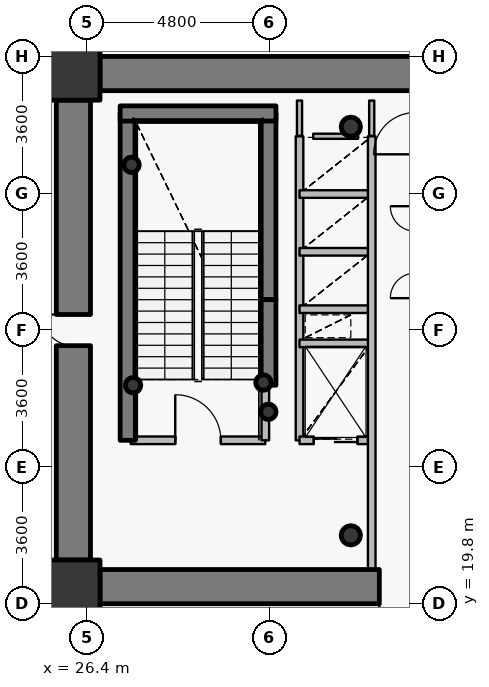
"""IFC4 building model, lengths in metres.
Left out: names, types, materials, properties, quantities, classifications, styles, units other than length and angle.
Written with IfcOpenShell. Run it as: python <this file> out.ifc"""

import sys

from ifc_helpers import new_model, si_unit, direction, frame, frame_2d, origin, origin_2d, place, context, subcontext, project, spatial, rectangle, hollow_circle, extrude, source, transform, mapped, element, fill, save


model = new_model("IFC4")
c1 = context("Model", 3, precision=1e-05, world=origin(), true_north=direction((0.0, 1.0)))
c2 = subcontext(c1, "Body", "Model", "MODEL_VIEW")
j1 = project(units=[si_unit("LENGTHUNIT", "METRE"), si_unit("PLANEANGLEUNIT", "RADIAN")], contexts=[c1])
p1 = place(None, origin())
s1 = spatial("IfcSite", under=j1, at=p1, CompositionType="ELEMENT")
p2 = place(p1, origin())
s2 = spatial("IfcBuilding", under=s1, at=p2, CompositionType="ELEMENT")
p3 = place(p2, frame((0.0, 0.0, 40.8)))
s3 = spatial("IfcBuildingStorey", under=s2, at=p3, CompositionType="ELEMENT", Elevation=40.8)
for number, where, z_axis, x_axis in (
    (1, (26.05, 20.25, 0.0), (0.0, 0.0, 1.0), (1.0, 0.0, 0.0)),
    (2, (26.05, 33.75, 0.0), (0.0, 0.0, 1.0), (1.0, 0.0, 0.0)),
):
    element("IfcColumn", number, at=place(p3, frame(where, z_axis=z_axis, x_axis=x_axis)), inside=s3, PredefinedType="COLUMN", context=c2, shape_type="SweptSolid", body=[
        extrude(rectangle(XDim=1.4, YDim=1.4, at=origin_2d()), origin(), (0.0, 0.0, 1.0), 4.2),
    ])
for number, where, z_axis, x_axis in (
    (3, (33.35, 21.6, 0.0), (0.0, 0.0, 1.0), (1.0, 0.0, 0.0)),
    (4, (33.35, 32.35, 0.0), (0.0, 0.0, 1.0), (1.0, 0.0, 0.0)),
):
    element("IfcColumn", number, at=place(p3, frame(where, z_axis=z_axis, x_axis=x_axis)), inside=s3, PredefinedType="COLUMN", context=c2, shape_type="SweptSolid", body=[
        extrude(hollow_circle(Radius=0.254, WallThickness=0.02, at=origin_2d()), origin(), (0.0, 0.0, 1.0), 4.2),
    ])
p4 = place(p3, frame((27.48, 24.1, 0.0), z_axis=(0.0, 0.0, 1.0), x_axis=(0.0, 1.0, 0.0)))
e5 = element("IfcWall", 5, at=p4, inside=s3, PredefinedType="SHEAR", context=c2, shape_type="SweptSolid", body=[
    extrude(rectangle(XDim=8.6, YDim=0.4, at=frame_2d((4.3, 0.0))), origin(), (0.0, 0.0, 1.0), 4.2),
])
p5 = place(p3, frame((31.18, 27.8, 0.0), z_axis=(0.0, 0.0, 1.0), x_axis=(0.0, 1.0, 0.0)))
e6 = element("IfcWall", 6, at=p5, inside=s3, PredefinedType="SHEAR", context=c2, shape_type="SweptSolid", body=[
    extrude(rectangle(XDim=4.9, YDim=0.4, at=frame_2d((2.45, 0.0))), origin(), (0.0, 0.0, 1.0), 4.2),
])
p6 = place(p3, frame((27.28, 32.7, 0.0), z_axis=(0.0, 0.0, 1.0), x_axis=(1.0, 0.0, 0.0)))
e7 = element("IfcWall", 7, at=p6, inside=s3, PredefinedType="SHEAR", context=c2, shape_type="SweptSolid", body=[
    extrude(rectangle(XDim=4.1, YDim=0.4, at=frame_2d((2.05, 0.0))), origin(), (0.0, 0.0, 1.0), 4.2),
])
for number, where, z_axis, x_axis in (
    (8, (27.58, 31.35, 0.0), (0.0, 0.0, 1.0), (1.0, 0.0, 0.0)),
    (9, (31.05, 25.62, 0.0), (0.0, 0.0, 1.0), (1.0, 0.0, 0.0)),
    (10, (31.18, 24.85, 0.0), (0.0, 0.0, 1.0), (1.0, 0.0, 0.0)),
    (11, (27.62, 25.55, 0.0), (0.0, 0.0, 1.0), (1.0, 0.0, 0.0)),
):
    element("IfcColumn", number, at=place(p3, frame(where, z_axis=z_axis, x_axis=x_axis)), inside=s3, PredefinedType="COLUMN", context=c2, shape_type="SweptSolid", body=[
        extrude(hollow_circle(Radius=0.203, WallThickness=0.016, at=origin_2d()), origin(), (0.0, 0.0, 1.0), 4.2),
    ])
p7 = place(p3, frame((26.75, 33.75, 0.0), z_axis=(0.0, 0.0, 1.0), x_axis=(1.0, 0.0, 0.0)))
e12 = element("IfcWall", 12, at=p7, inside=s3, PredefinedType="SHEAR", context=c2, shape_type="SweptSolid", body=[
    extrude(rectangle(XDim=18.5, YDim=0.9, at=frame_2d((9.25, 0.0))), origin(), (0.0, 0.0, 1.0), 3.4),
])
p8 = place(p3, frame((45.25, 20.25, 0.0), z_axis=(0.0, 0.0, 1.0), x_axis=(-1.0, 0.0, 0.0)))
e13 = element("IfcWall", 13, at=p8, inside=s3, PredefinedType="SHEAR", context=c2, shape_type="SweptSolid", body=[
    extrude(rectangle(XDim=18.5, YDim=0.9, at=frame_2d((9.25, 0.0))), origin(), (0.0, 0.0, 1.0), 3.4),
])
p9 = place(p8, frame((10.0, 0.0, 0.0)))
e14 = element("IfcOpeningElement", 14, at=p9, cuts=e13, PredefinedType="OPENING", context=c2, shape_type="SweptSolid", body=[
    extrude(rectangle(XDim=1.15, YDim=2.15, at=origin_2d()), frame((0.575, 0.46, 1.075), z_axis=(0.0, -1.0, 0.0), x_axis=(1.0, 0.0, 0.0)), (0.0, 0.0, 1.0), 0.92),
])
p10 = place(p3, frame((26.05, 20.95, 0.0), z_axis=(0.0, 0.0, 1.0), x_axis=(0.0, 1.0, 0.0)))
e15 = element("IfcWall", 15, at=p10, inside=s3, PredefinedType="SHEAR", context=c2, shape_type="SweptSolid", body=[
    extrude(rectangle(XDim=12.1, YDim=0.9, at=frame_2d((6.05, 0.0))), origin(), (0.0, 0.0, 1.0), 3.4),
])
p11 = place(p10, frame((5.64, 0.0, 0.0)))
e16 = element("IfcOpeningElement", 16, at=p11, cuts=e15, PredefinedType="OPENING", context=c2, shape_type="SweptSolid", body=[
    extrude(rectangle(XDim=0.82, YDim=2.1, at=origin_2d()), frame((0.41, 0.46, 1.05), z_axis=(0.0, -1.0, 0.0), x_axis=(1.0, 0.0, 0.0)), (0.0, 0.0, 1.0), 0.92),
])
p12 = place(p3, frame((31.18, 25.55, 0.0), z_axis=(0.0, 0.0, 1.0), x_axis=(0.0, 1.0, 0.0)))
e17 = element("IfcWall", 17, at=p12, inside=s3, PredefinedType="SHEAR", context=c2, shape_type="SweptSolid", body=[
    extrude(rectangle(XDim=2.25, YDim=0.4, at=frame_2d((1.125, 0.0))), origin(), (0.0, 0.0, 1.0), 3.55),
])
p13 = place(p3, frame((27.56, 24.1, 0.0), z_axis=(0.0, 0.0, 1.0), x_axis=(1.0, 0.0, 0.0)))
e18 = element("IfcWall", 18, at=p13, inside=s3, PredefinedType="PARTITIONING", context=c2, shape_type="SweptSolid", body=[
    extrude(rectangle(XDim=3.54, YDim=0.2, at=frame_2d((1.77, 0.0))), origin(), (0.0, 0.0, 1.0), 3.95),
])
p14 = place(p13, frame((1.17, 0.0, 0.0)))
e19 = element("IfcOpeningElement", 19, at=p14, cuts=e18, PredefinedType="OPENING", context=c2, shape_type="SweptSolid", body=[
    extrude(rectangle(XDim=1.2, YDim=2.15, at=origin_2d()), frame((0.6, 0.11, 1.075), z_axis=(0.0, -1.0, 0.0), x_axis=(1.0, 0.0, 0.0)), (0.0, 0.0, 1.0), 0.22),
])
p15 = place(p3, frame((31.1, 24.1, 0.0), z_axis=(0.0, 0.0, 1.0), x_axis=(0.0, 1.0, 0.0)))
e20 = element("IfcWall", 20, at=p15, inside=s3, PredefinedType="PARTITIONING", context=c2, shape_type="SweptSolid", body=[
    extrude(rectangle(XDim=1.44, YDim=0.2, at=frame_2d((0.72, 0.0))), origin(), (0.0, 0.0, 1.0), 3.95),
])
p16 = place(p3, frame((32.0, 24.1, 0.0), z_axis=(0.0, 0.0, 1.0), x_axis=(0.0, 1.0, 0.0)))
e21 = element("IfcWall", 21, at=p16, inside=s3, PredefinedType="PARTITIONING", context=c2, shape_type="SweptSolid", body=[
    extrude(rectangle(XDim=8.0, YDim=0.2, at=frame_2d((4.0, 0.0))), origin(), (0.0, 0.0, 1.0), 3.95),
])
p17 = place(p3, frame((32.0, 24.1, 0.0), z_axis=(0.0, 0.0, 1.0), x_axis=(1.0, 0.0, 0.0)))
e22 = element("IfcWall", 22, at=p17, inside=s3, PredefinedType="PARTITIONING", context=c2, shape_type="SweptSolid", body=[
    extrude(rectangle(XDim=1.9, YDim=0.2, at=frame_2d((0.95, 0.0))), origin(), (0.0, 0.0, 1.0), 3.535),
])
p18 = place(p17, frame((0.375, 0.0, 0.0)))
e23 = element("IfcOpeningElement", 23, at=p18, cuts=e22, PredefinedType="OPENING", context=c2, shape_type="SweptSolid", body=[
    extrude(rectangle(XDim=1.15, YDim=2.15, at=origin_2d()), frame((0.575, 0.11, 1.075), z_axis=(0.0, -1.0, 0.0), x_axis=(1.0, 0.0, 0.0)), (0.0, 0.0, 1.0), 0.22),
])
for number, where, z_axis, x_axis in (
    (24, (32.0, 26.65, 0.0), (0.0, 0.0, 1.0), (1.0, 0.0, 0.0)),
    (25, (32.0, 27.55, 0.0), (0.0, 0.0, 1.0), (1.0, 0.0, 0.0)),
    (26, (32.0, 29.06, 0.0), (0.0, 0.0, 1.0), (1.0, 0.0, 0.0)),
    (27, (32.0, 30.58, 0.0), (0.0, 0.0, 1.0), (1.0, 0.0, 0.0)),
):
    element("IfcWall", number, at=place(p3, frame(where, z_axis=z_axis, x_axis=x_axis)), inside=s3, PredefinedType="PARTITIONING", context=c2, shape_type="SweptSolid", body=[
        extrude(rectangle(XDim=1.9, YDim=0.2, at=frame_2d((0.95, 0.0))), origin(), (0.0, 0.0, 1.0), 3.535),
    ])
p19 = place(p3, frame((33.9, 20.7, 0.0), z_axis=(0.0, 0.0, 1.0), x_axis=(0.0, 1.0, 0.0)))
e28 = element("IfcWall", 28, at=p19, inside=s3, PredefinedType="PARTITIONING", context=c2, shape_type="SweptSolid", body=[
    extrude(rectangle(XDim=11.4, YDim=0.2, at=frame_2d((5.7, 0.0))), origin(), (0.0, 0.0, 1.0), 3.535),
])
p20 = place(p3, frame((32.36, 32.1, 0.0), z_axis=(0.0, 0.0, 1.0), x_axis=(1.0, 0.0, 0.0)))
e29 = element("IfcWall", 29, at=p20, inside=s3, PredefinedType="PARTITIONING", context=c2, shape_type="SweptSolid", body=[
    extrude(rectangle(XDim=1.18, YDim=0.135, at=frame_2d((0.59, 0.0))), origin(), (0.0, 0.0, 1.0), 3.535),
])
p21 = place(p3, frame((32.0, 33.04, 0.0), z_axis=(0.0, 0.0, 1.0), x_axis=(0.0, -1.0, 0.0)))
e30 = element("IfcWall", 30, at=p21, inside=s3, PredefinedType="PARTITIONING", context=c2, shape_type="SweptSolid", body=[
    extrude(rectangle(XDim=0.93, YDim=0.135, at=frame_2d((0.465, 0.0))), origin(), (0.0, 0.0, 1.0), 3.485),
])
p22 = place(p3, frame((33.9, 32.11, 0.0), z_axis=(0.0, 0.0, 1.0), x_axis=(0.0, 1.0, 0.0)))
e31 = element("IfcWall", 31, at=p22, inside=s3, PredefinedType="PARTITIONING", context=c2, shape_type="SweptSolid", body=[
    extrude(rectangle(XDim=0.93, YDim=0.135, at=frame_2d((0.465, 0.0))), origin(), (0.0, 0.0, 1.0), 3.535),
])
p23 = place(p3, frame((25.95, 38.893, 0.0), z_axis=(0.0, 0.0, 1.0), x_axis=(0.0, -1.0, 0.0)))
e32 = element("IfcWall", 32, at=p23, inside=s3, PredefinedType="PARTITIONING", context=c2, shape_type="SweptSolid", body=[
    extrude(rectangle(XDim=4.693, YDim=0.135, at=frame_2d((2.346, 0.0))), origin(), (0.0, 0.0, 1.0), 3.285),
])
for number, where, z_axis, x_axis in (
    (33, (25.6, 34.2, 0.0), (0.0, 0.0, 1.0), (0.0, -1.0, 0.0)),
    (34, (25.6, 20.94, 0.0), (0.0, 0.0, 1.0), (0.0, -1.0, 0.0)),
):
    element("IfcWall", number, at=place(p3, frame(where, z_axis=z_axis, x_axis=x_axis)), inside=s3, PredefinedType="PARTITIONING", context=c2, shape_type="SweptSolid", body=[
        extrude(rectangle(XDim=1.14, YDim=0.135, at=frame_2d((0.57, 0.0))), origin(), (0.0, 0.0, 1.0), 3.95),
    ])
p24 = place(p3, frame((25.907, 19.8, 0.0), z_axis=(0.0, 0.0, 1.0), x_axis=(1.0, 0.0, 0.0)))
e35 = element("IfcWall", 35, at=p24, inside=s3, PredefinedType="PARTITIONING", context=c2, shape_type="SweptSolid", body=[
    extrude(rectangle(XDim=0.833, YDim=0.135, at=frame_2d((0.416, 0.0))), origin(), (0.0, 0.0, 1.0), 3.285),
])
m1 = source(origin(), c2, "Body", "SweptSolid", [
    extrude(rectangle(XDim=0.82, YDim=2.1, at=origin_2d()), frame((0.41, 0.025, 1.05), z_axis=(0.0, -1.0, 0.0), x_axis=(1.0, 0.0, 0.0)), (0.0, 0.0, 1.0), 0.05),
])
p25 = place(p11, origin())
e36 = element("IfcDoor", 36, at=p25, inside=s3, OperationType="SINGLE_SWING_RIGHT", PredefinedType="DOOR", context=c2, shape_type="MappedRepresentation", body=[
    mapped(m1, transform((0.0, 0.0, 0.0), x_axis=(1.0, 0.0, 0.0), y_axis=(0.0, 1.0, 0.0), z_axis=(0.0, 0.0, 1.0), scale=1.0)),
])
fill(e16, e36)
m2 = source(origin(), c2, "Body", "SweptSolid", [
    extrude(rectangle(XDim=1.15, YDim=2.15, at=origin_2d()), frame((0.575, 0.025, 1.075), z_axis=(0.0, -1.0, 0.0), x_axis=(1.0, 0.0, 0.0)), (0.0, 0.0, 1.0), 0.05),
])
p26 = place(p9, origin())
e37 = element("IfcDoor", 37, at=p26, inside=s3, OperationType="SINGLE_SWING_RIGHT", PredefinedType="DOOR", context=c2, shape_type="MappedRepresentation", body=[
    mapped(m2, transform((0.0, 0.0, 0.0), x_axis=(1.0, 0.0, 0.0), y_axis=(0.0, 1.0, 0.0), z_axis=(0.0, 0.0, 1.0), scale=1.0)),
])
fill(e14, e37)
m3 = source(origin(), c2, "Body", "SweptSolid", [
    extrude(rectangle(XDim=1.2, YDim=2.15, at=origin_2d()), frame((0.6, 0.025, 1.075), z_axis=(0.0, -1.0, 0.0), x_axis=(1.0, 0.0, 0.0)), (0.0, 0.0, 1.0), 0.05),
])
p27 = place(p14, origin())
e38 = element("IfcDoor", 38, at=p27, inside=s3, OperationType="SINGLE_SWING_LEFT", PredefinedType="DOOR", context=c2, shape_type="MappedRepresentation", body=[
    mapped(m3, transform((0.0, 0.0, 0.0), x_axis=(1.0, 0.0, 0.0), y_axis=(0.0, 1.0, 0.0), z_axis=(0.0, 0.0, 1.0), scale=1.0)),
])
fill(e19, e38)
m4 = source(origin(), c2, "Body", "SweptSolid", [
    extrude(rectangle(XDim=1.15, YDim=2.15, at=origin_2d()), frame((0.575, 0.025, 1.075), z_axis=(0.0, -1.0, 0.0), x_axis=(1.0, 0.0, 0.0)), (0.0, 0.0, 1.0), 0.05),
])
p28 = place(p18, origin())
e39 = element("IfcDoor", 39, at=p28, inside=s3, OperationType="DOUBLE_DOOR_SLIDING", PredefinedType="USERDEFINED", context=c2, shape_type="MappedRepresentation", body=[
    mapped(m4, transform((0.0, 0.0, 0.0), x_axis=(1.0, 0.0, 0.0), y_axis=(0.0, 1.0, 0.0), z_axis=(0.0, 0.0, 1.0), scale=1.0)),
])
fill(e23, e39)
save(model, sys.argv[1])
